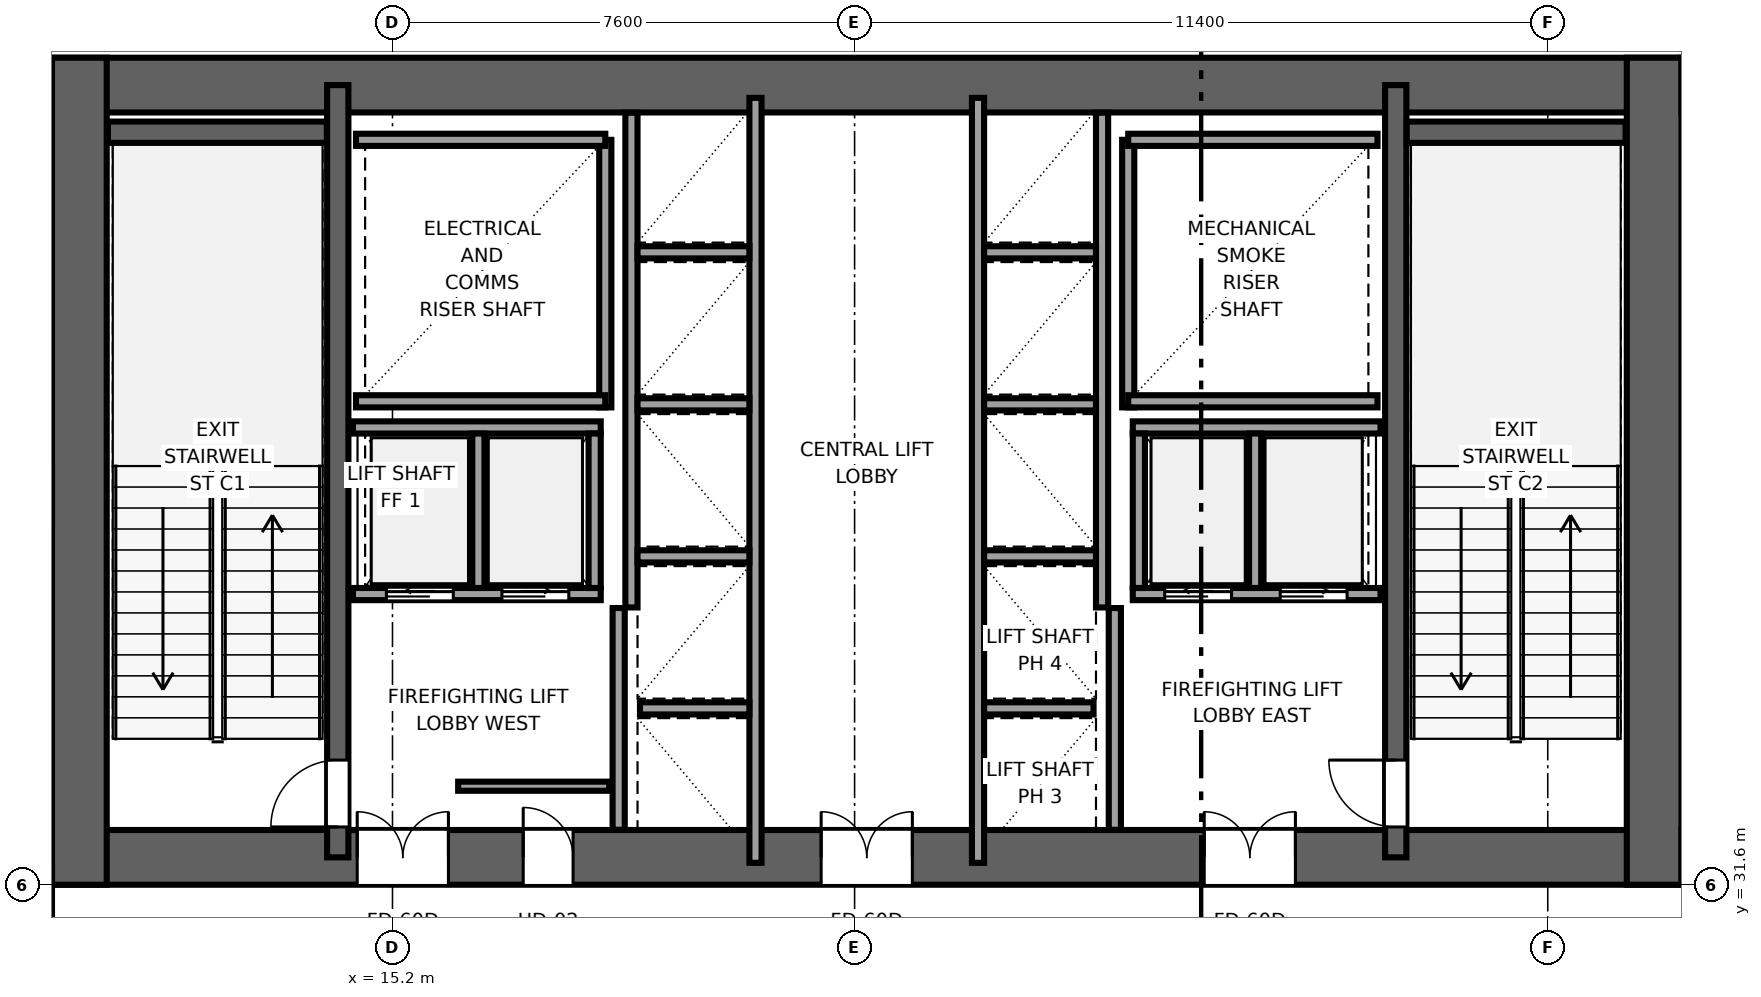
"""IFC4 building model, lengths in metres.
Left out: names, types, materials, properties, quantities, classifications, styles, units other than length and angle.
Written with IfcOpenShell. Run it as: python <this file> out.ifc"""

import sys

from ifc_helpers import new_model, si_unit, direction, frame, frame_2d, origin, place, context, subcontext, project, spatial, rectangle, extrude, source, transform, mapped, element, fill, save


model = new_model("IFC4")
c1 = context("Model", 3, precision=1e-05, world=origin(), true_north=direction((0.0, 1.0)))
c2 = subcontext(c1, "Body", "Model", "MODEL_VIEW")
j1 = project(units=[si_unit("LENGTHUNIT", "METRE"), si_unit("PLANEANGLEUNIT", "RADIAN")], contexts=[c1])
p1 = place(None, origin())
s1 = spatial("IfcSite", under=j1, at=p1, CompositionType="ELEMENT")
p2 = place(p1, origin())
s2 = spatial("IfcBuilding", under=s1, at=p2, CompositionType="ELEMENT")
p3 = place(p2, frame((0.0, 0.0, 6.0)))
s3 = spatial("IfcBuildingStorey", under=s2, at=p3, CompositionType="ELEMENT", Elevation=6.0)
p4 = place(p3, frame((9.6, 32.05, 0.0), z_axis=(0.0, 0.0, 1.0), x_axis=(1.0, 0.0, 0.0)))
e1 = element("IfcWall", 1, at=p4, inside=s3, PredefinedType="SHEAR", context=c2, shape_type="SweptSolid", body=[
    extrude(rectangle(XDim=26.8, YDim=0.9, at=frame_2d((13.4, 0.0))), origin(), (0.0, 0.0, 1.0), 5.0),
])
p5 = place(p4, frame((6.52, 0.0, 0.0), z_axis=(0.0, 0.0, 1.0), x_axis=(-1.0, 0.0, 0.0)))
e2 = element("IfcOpeningElement", 2, at=p5, cuts=e1, PredefinedType="OPENING", context=c2, shape_type="SweptSolid", body=[
    extrude(rectangle(XDim=1.5, YDim=2.04, at=frame_2d((0.75, 1.02))), frame((0.0, 0.46, 0.0), z_axis=(0.0, -1.0, 0.0), x_axis=(1.0, 0.0, 0.0)), (0.0, 0.0, 1.0), 0.92),
])
p6 = place(p4, frame((14.15, 0.0, 0.0), z_axis=(0.0, 0.0, 1.0), x_axis=(-1.0, 0.0, 0.0)))
e3 = element("IfcOpeningElement", 3, at=p6, cuts=e1, PredefinedType="OPENING", context=c2, shape_type="SweptSolid", body=[
    extrude(rectangle(XDim=1.5, YDim=2.04, at=frame_2d((0.75, 1.02))), frame((0.0, 0.46, 0.0), z_axis=(0.0, -1.0, 0.0), x_axis=(1.0, 0.0, 0.0)), (0.0, 0.0, 1.0), 0.92),
])
p7 = place(p4, frame((20.45, 0.0, 0.0), z_axis=(0.0, 0.0, 1.0), x_axis=(-1.0, 0.0, 0.0)))
e4 = element("IfcOpeningElement", 4, at=p7, cuts=e1, PredefinedType="OPENING", context=c2, shape_type="SweptSolid", body=[
    extrude(rectangle(XDim=1.5, YDim=2.04, at=frame_2d((0.75, 1.02))), frame((0.0, 0.46, 0.0), z_axis=(0.0, -1.0, 0.0), x_axis=(1.0, 0.0, 0.0)), (0.0, 0.0, 1.0), 0.92),
])
p8 = place(p4, frame((8.57, 0.0, 0.0), z_axis=(0.0, 0.0, 1.0), x_axis=(-1.0, 0.0, 0.0)))
e5 = element("IfcOpeningElement", 5, at=p8, cuts=e1, PredefinedType="OPENING", context=c2, shape_type="SweptSolid", body=[
    extrude(rectangle(XDim=0.82, YDim=2.01, at=frame_2d((0.41, 1.005))), frame((0.0, 0.46, 0.0), z_axis=(0.0, -1.0, 0.0), x_axis=(1.0, 0.0, 0.0)), (0.0, 0.0, 1.0), 0.92),
])
p9 = place(p3, frame((9.6, 44.75, 0.0), z_axis=(0.0, 0.0, 1.0), x_axis=(1.0, 0.0, 0.0)))
e6 = element("IfcWall", 6, at=p9, inside=s3, PredefinedType="SHEAR", context=c2, shape_type="SweptSolid", body=[
    extrude(rectangle(XDim=26.8, YDim=0.9, at=frame_2d((13.4, 0.0))), origin(), (0.0, 0.0, 1.0), 5.0),
])
for number, where, z_axis, x_axis in (
    (7, (10.05, 31.6, 0.0), (0.0, 0.0, 1.0), (0.0, 1.0, 0.0)),
    (8, (35.95, 31.6, 0.0), (0.0, 0.0, 1.0), (0.0, 1.0, 0.0)),
):
    element("IfcWall", number, at=place(p3, frame(where, z_axis=z_axis, x_axis=x_axis)), inside=s3, PredefinedType="SHEAR", context=c2, shape_type="SweptSolid", body=[
        extrude(rectangle(XDim=13.6, YDim=0.9, at=frame_2d((6.8, 0.0))), origin(), (0.0, 0.0, 1.0), 5.0),
    ])
p10 = place(p3, frame((14.3, 32.05, 0.0), z_axis=(0.0, 0.0, 1.0), x_axis=(0.0, 1.0, 0.0)))
e9 = element("IfcWall", 9, at=p10, inside=s3, PredefinedType="SHEAR", context=c2, shape_type="SweptSolid", body=[
    extrude(rectangle(XDim=12.7, YDim=0.35, at=frame_2d((6.35, 0.0))), origin(), (0.0, 0.0, 1.0), 5.0),
])
p11 = place(p10, frame((0.5, 0.0, 0.0)))
e10 = element("IfcOpeningElement", 10, at=p11, cuts=e9, PredefinedType="OPENING", context=c2, shape_type="SweptSolid", body=[
    extrude(rectangle(XDim=1.1, YDim=2.12, at=frame_2d((0.55, 1.06))), frame((0.0, 0.185, 0.0), z_axis=(0.0, -1.0, 0.0), x_axis=(1.0, 0.0, 0.0)), (0.0, 0.0, 1.0), 0.37),
])
p12 = place(p3, frame((31.7, 32.05, 0.0), z_axis=(0.0, 0.0, 1.0), x_axis=(0.0, 1.0, 0.0)))
e11 = element("IfcWall", 11, at=p12, inside=s3, PredefinedType="SHEAR", context=c2, shape_type="SweptSolid", body=[
    extrude(rectangle(XDim=12.7, YDim=0.35, at=frame_2d((6.35, 0.0))), origin(), (0.0, 0.0, 1.0), 5.0),
])
p13 = place(p12, frame((1.6, 0.0, 0.0), z_axis=(0.0, 0.0, 1.0), x_axis=(-1.0, 0.0, 0.0)))
e12 = element("IfcOpeningElement", 12, at=p13, cuts=e11, PredefinedType="OPENING", context=c2, shape_type="SweptSolid", body=[
    extrude(rectangle(XDim=1.1, YDim=2.12, at=frame_2d((0.55, 1.06))), frame((0.0, 0.185, 0.0), z_axis=(0.0, -1.0, 0.0), x_axis=(1.0, 0.0, 0.0)), (0.0, 0.0, 1.0), 0.37),
])
for number, where, z_axis, x_axis in (
    (13, (10.52, 43.975, 0.0), (0.0, 0.0, 1.0), (1.0, 0.0, 0.0)),
    (14, (31.88, 43.975, 0.0), (0.0, 0.0, 1.0), (1.0, 0.0, 0.0)),
):
    element("IfcWall", number, at=place(p3, frame(where, z_axis=z_axis, x_axis=x_axis)), inside=s3, PredefinedType="SHEAR", context=c2, shape_type="SweptSolid", body=[
        extrude(rectangle(XDim=3.6, YDim=0.35, at=frame_2d((1.8, 0.0))), origin(), (0.0, 0.0, 1.0), 5.0),
    ])
p14 = place(p3, frame((18.7, 39.45, 0.0), z_axis=(0.0, 0.0, 1.0), x_axis=(0.0, 1.0, 0.0)))
e15 = element("IfcWall", 15, at=p14, inside=s3, PredefinedType="SOLIDWALL", context=c2, shape_type="SweptSolid", body=[
    extrude(rectangle(XDim=4.4, YDim=0.2, at=frame_2d((2.2, 0.0))), origin(), (0.0, 0.0, 1.0), 4.74),
])
for number, where, z_axis, x_axis in (
    (16, (14.6, 39.55, 0.0), (0.0, 0.0, 1.0), (1.0, 0.0, 0.0)),
    (17, (14.6, 43.85, 0.0), (0.0, 0.0, 1.0), (1.0, 0.0, 0.0)),
):
    element("IfcWall", number, at=place(p3, frame(where, z_axis=z_axis, x_axis=x_axis)), inside=s3, PredefinedType="SOLIDWALL", context=c2, shape_type="SweptSolid", body=[
        extrude(rectangle(XDim=4.1, YDim=0.2, at=frame_2d((2.05, 0.0))), origin(), (0.0, 0.0, 1.0), 4.74),
    ])
p15 = place(p3, frame((27.3, 39.45, 0.0), z_axis=(0.0, 0.0, 1.0), x_axis=(0.0, 1.0, 0.0)))
e18 = element("IfcWall", 18, at=p15, inside=s3, PredefinedType="SOLIDWALL", context=c2, shape_type="SweptSolid", body=[
    extrude(rectangle(XDim=4.4, YDim=0.2, at=frame_2d((2.2, 0.0))), origin(), (0.0, 0.0, 1.0), 4.74),
])
for number, where, z_axis, x_axis in (
    (19, (27.3, 39.55, 0.0), (0.0, 0.0, 1.0), (1.0, 0.0, 0.0)),
    (20, (27.3, 43.85, 0.0), (0.0, 0.0, 1.0), (1.0, 0.0, 0.0)),
):
    element("IfcWall", number, at=place(p3, frame(where, z_axis=z_axis, x_axis=x_axis)), inside=s3, PredefinedType="SOLIDWALL", context=c2, shape_type="SweptSolid", body=[
        extrude(rectangle(XDim=4.1, YDim=0.2, at=frame_2d((2.05, 0.0))), origin(), (0.0, 0.0, 1.0), 4.74),
    ])
for number, where, z_axis, x_axis in (
    (21, (18.92, 32.504, 0.0), (0.0, 0.0, 1.0), (0.0, 1.0, 0.0)),
    (22, (27.08, 32.504, 0.0), (0.0, 0.0, 1.0), (0.0, 1.0, 0.0)),
):
    element("IfcWall", number, at=place(p3, frame(where, z_axis=z_axis, x_axis=x_axis)), inside=s3, PredefinedType="SOLIDWALL", context=c2, shape_type="SweptSolid", body=[
        extrude(rectangle(XDim=3.646, YDim=0.2, at=frame_2d((1.823, 0.0))), origin(), (0.0, 0.0, 1.0), 4.74),
    ])
p16 = place(p3, frame((21.17, 31.96, 0.0), z_axis=(0.0, 0.0, 1.0), x_axis=(0.0, 1.0, 0.0)))
e23 = element("IfcWall", 23, at=p16, inside=s3, PredefinedType="SOLIDWALL", context=c2, shape_type="SweptSolid", body=[
    extrude(rectangle(XDim=12.58, YDim=0.2, at=frame_2d((6.29, 0.0))), origin(), (0.0, 0.0, 1.0), 4.74),
])
p17 = place(p3, frame((19.13, 36.16, 0.0), z_axis=(0.0, 0.0, 1.0), x_axis=(0.0, 1.0, 0.0)))
e24 = element("IfcWall", 24, at=p17, inside=s3, PredefinedType="SOLIDWALL", context=c2, shape_type="SweptSolid", body=[
    extrude(rectangle(XDim=8.136, YDim=0.2, at=frame_2d((4.068, 0.0))), origin(), (0.0, 0.0, 1.0), 4.74),
])
p18 = place(p3, frame((19.27, 34.5, 0.0), z_axis=(0.0, 0.0, 1.0), x_axis=(1.0, 0.0, 0.0)))
e25 = element("IfcWall", 25, at=p18, inside=s3, PredefinedType="SOLIDWALL", context=c2, shape_type="SweptSolid", body=[
    extrude(rectangle(XDim=1.8, YDim=0.2, at=frame_2d((0.9, 0.0))), origin(), (0.0, 0.0, 1.0), 4.74),
])
for number, where, z_axis, x_axis in (
    (26, (19.23, 37.0, 0.0), (0.0, 0.0, 1.0), (1.0, 0.0, 0.0)),
    (27, (19.23, 39.5, 0.0), (0.0, 0.0, 1.0), (1.0, 0.0, 0.0)),
    (28, (19.23, 42.0, 0.0), (0.0, 0.0, 1.0), (1.0, 0.0, 0.0)),
):
    element("IfcWall", number, at=place(p3, frame(where, z_axis=z_axis, x_axis=x_axis)), inside=s3, PredefinedType="SOLIDWALL", context=c2, shape_type="SweptSolid", body=[
        extrude(rectangle(XDim=1.84, YDim=0.2, at=frame_2d((0.92, 0.0))), origin(), (0.0, 0.0, 1.0), 4.74),
    ])
p19 = place(p3, frame((27.375, 36.38, 0.0), z_axis=(0.0, 0.0, 1.0), x_axis=(1.0, 0.0, 0.0)))
e29 = element("IfcWall", 29, at=p19, inside=s3, PredefinedType="SOLIDWALL", context=c2, shape_type="SweptSolid", body=[
    extrude(rectangle(XDim=4.075, YDim=0.2, at=frame_2d((2.038, 0.0))), origin(), (0.0, 0.0, 1.0), 4.74),
])
p20 = place(p19, frame((0.525, 0.0, 0.0)))
e30 = element("IfcOpeningElement", 30, at=p20, cuts=e29, PredefinedType="OPENING", context=c2, shape_type="SweptSolid", body=[
    extrude(rectangle(XDim=1.1, YDim=2.12, at=frame_2d((0.55, 1.06))), frame((0.0, 0.11, 0.0), z_axis=(0.0, -1.0, 0.0), x_axis=(1.0, 0.0, 0.0)), (0.0, 0.0, 1.0), 0.22),
])
p21 = place(p19, frame((2.425, 0.0, 0.0)))
e31 = element("IfcOpeningElement", 31, at=p21, cuts=e29, PredefinedType="OPENING", context=c2, shape_type="SweptSolid", body=[
    extrude(rectangle(XDim=1.1, YDim=2.12, at=frame_2d((0.55, 1.06))), frame((0.0, 0.11, 0.0), z_axis=(0.0, -1.0, 0.0), x_axis=(1.0, 0.0, 0.0)), (0.0, 0.0, 1.0), 0.22),
])
p22 = place(p3, frame((27.375, 39.12, 0.0), z_axis=(0.0, 0.0, 1.0), x_axis=(1.0, 0.0, 0.0)))
e32 = element("IfcWall", 32, at=p22, inside=s3, PredefinedType="SOLIDWALL", context=c2, shape_type="SweptSolid", body=[
    extrude(rectangle(XDim=4.075, YDim=0.2, at=frame_2d((2.038, 0.0))), origin(), (0.0, 0.0, 1.0), 4.74),
])
for number, where, z_axis, x_axis in (
    (33, (27.475, 36.48, 0.0), (0.0, 0.0, 1.0), (0.0, 1.0, 0.0)),
    (34, (29.387, 36.48, 0.0), (0.0, 0.0, 1.0), (0.0, 1.0, 0.0)),
):
    element("IfcWall", number, at=place(p3, frame(where, z_axis=z_axis, x_axis=x_axis)), inside=s3, PredefinedType="SOLIDWALL", context=c2, shape_type="SweptSolid", body=[
        extrude(rectangle(XDim=2.54, YDim=0.2, at=frame_2d((1.27, 0.0))), origin(), (0.0, 0.0, 1.0), 4.74),
    ])
p23 = place(p3, frame((14.55, 36.38, 0.0), z_axis=(0.0, 0.0, 1.0), x_axis=(1.0, 0.0, 0.0)))
e35 = element("IfcWall", 35, at=p23, inside=s3, PredefinedType="SOLIDWALL", context=c2, shape_type="SweptSolid", body=[
    extrude(rectangle(XDim=4.075, YDim=0.2, at=frame_2d((2.038, 0.0))), origin(), (0.0, 0.0, 1.0), 4.74),
])
p24 = place(p23, frame((0.55, 0.0, 0.0)))
e36 = element("IfcOpeningElement", 36, at=p24, cuts=e35, PredefinedType="OPENING", context=c2, shape_type="SweptSolid", body=[
    extrude(rectangle(XDim=1.1, YDim=2.12, at=frame_2d((0.55, 1.06))), frame((0.0, 0.11, 0.0), z_axis=(0.0, -1.0, 0.0), x_axis=(1.0, 0.0, 0.0)), (0.0, 0.0, 1.0), 0.22),
])
p25 = place(p23, frame((2.45, 0.0, 0.0)))
e37 = element("IfcOpeningElement", 37, at=p25, cuts=e35, PredefinedType="OPENING", context=c2, shape_type="SweptSolid", body=[
    extrude(rectangle(XDim=1.1, YDim=2.12, at=frame_2d((0.55, 1.06))), frame((0.0, 0.11, 0.0), z_axis=(0.0, -1.0, 0.0), x_axis=(1.0, 0.0, 0.0)), (0.0, 0.0, 1.0), 0.22),
])
p26 = place(p3, frame((14.55, 39.12, 0.0), z_axis=(0.0, 0.0, 1.0), x_axis=(1.0, 0.0, 0.0)))
e38 = element("IfcWall", 38, at=p26, inside=s3, PredefinedType="SOLIDWALL", context=c2, shape_type="SweptSolid", body=[
    extrude(rectangle(XDim=4.075, YDim=0.2, at=frame_2d((2.038, 0.0))), origin(), (0.0, 0.0, 1.0), 4.74),
])
for number, where, z_axis, x_axis in (
    (39, (18.525, 36.48, 0.0), (0.0, 0.0, 1.0), (0.0, 1.0, 0.0)),
    (40, (16.613, 36.48, 0.0), (0.0, 0.0, 1.0), (0.0, 1.0, 0.0)),
):
    element("IfcWall", number, at=place(p3, frame(where, z_axis=z_axis, x_axis=x_axis)), inside=s3, PredefinedType="SOLIDWALL", context=c2, shape_type="SweptSolid", body=[
        extrude(rectangle(XDim=2.54, YDim=0.2, at=frame_2d((1.27, 0.0))), origin(), (0.0, 0.0, 1.0), 4.74),
    ])
p27 = place(p3, frame((24.83, 31.96, 0.0), z_axis=(0.0, 0.0, 1.0), x_axis=(0.0, 1.0, 0.0)))
e41 = element("IfcWall", 41, at=p27, inside=s3, PredefinedType="SOLIDWALL", context=c2, shape_type="SweptSolid", body=[
    extrude(rectangle(XDim=12.58, YDim=0.2, at=frame_2d((6.29, 0.0))), origin(), (0.0, 0.0, 1.0), 4.74),
])
p28 = place(p3, frame((26.87, 36.16, 0.0), z_axis=(0.0, 0.0, 1.0), x_axis=(0.0, 1.0, 0.0)))
e42 = element("IfcWall", 42, at=p28, inside=s3, PredefinedType="SOLIDWALL", context=c2, shape_type="SweptSolid", body=[
    extrude(rectangle(XDim=8.136, YDim=0.2, at=frame_2d((4.068, 0.0))), origin(), (0.0, 0.0, 1.0), 4.74),
])
p29 = place(p3, frame((24.93, 34.5, 0.0), z_axis=(0.0, 0.0, 1.0), x_axis=(1.0, 0.0, 0.0)))
e43 = element("IfcWall", 43, at=p29, inside=s3, PredefinedType="SOLIDWALL", context=c2, shape_type="SweptSolid", body=[
    extrude(rectangle(XDim=1.8, YDim=0.2, at=frame_2d((0.9, 0.0))), origin(), (0.0, 0.0, 1.0), 4.74),
])
for number, where, z_axis, x_axis in (
    (44, (24.93, 37.0, 0.0), (0.0, 0.0, 1.0), (1.0, 0.0, 0.0)),
    (45, (24.93, 39.5, 0.0), (0.0, 0.0, 1.0), (1.0, 0.0, 0.0)),
    (46, (24.93, 42.0, 0.0), (0.0, 0.0, 1.0), (1.0, 0.0, 0.0)),
):
    element("IfcWall", number, at=place(p3, frame(where, z_axis=z_axis, x_axis=x_axis)), inside=s3, PredefinedType="SOLIDWALL", context=c2, shape_type="SweptSolid", body=[
        extrude(rectangle(XDim=1.84, YDim=0.2, at=frame_2d((0.92, 0.0))), origin(), (0.0, 0.0, 1.0), 4.74),
    ])
p30 = place(p3, frame((16.28, 33.22, 0.0), z_axis=(0.0, 0.0, 1.0), x_axis=(1.0, 0.0, 0.0)))
e47 = element("IfcWall", 47, at=p30, inside=s3, PredefinedType="PARTITIONING", context=c2, shape_type="SweptSolid", body=[
    extrude(rectangle(XDim=2.485, YDim=0.15, at=frame_2d((1.242, 0.0))), origin(), (0.0, 0.0, 1.0), 4.74),
])
m1 = source(origin(), c2, "Body", "SweptSolid", [
    extrude(rectangle(XDim=1.1, YDim=2.12, at=frame_2d((0.55, 1.06))), frame((0.0, 0.025, 0.0), z_axis=(0.0, -1.0, 0.0), x_axis=(1.0, 0.0, 0.0)), (0.0, 0.0, 1.0), 0.05),
])
p31 = place(p11, origin())
e48 = element("IfcDoor", 48, at=p31, inside=s3, OperationType="SINGLE_SWING_LEFT", PredefinedType="DOOR", context=c2, shape_type="MappedRepresentation", body=[
    mapped(m1, transform((0.0, 0.0, 0.0), x_axis=(1.0, 0.0, 0.0), y_axis=(0.0, 1.0, 0.0), z_axis=(0.0, 0.0, 1.0), scale=1.0)),
])
fill(e10, e48)
p32 = place(p13, origin())
e49 = element("IfcDoor", 49, at=p32, inside=s3, OperationType="SINGLE_SWING_RIGHT", PredefinedType="DOOR", context=c2, shape_type="MappedRepresentation", body=[
    mapped(m1, transform((0.0, 0.0, 0.0), x_axis=(1.0, 0.0, 0.0), y_axis=(0.0, 1.0, 0.0), z_axis=(0.0, 0.0, 1.0), scale=1.0)),
])
fill(e12, e49)
m2 = source(origin(), c2, "Body", "SweptSolid", [
    extrude(rectangle(XDim=1.5, YDim=2.04, at=frame_2d((0.75, 1.02))), frame((0.0, 0.025, 0.0), z_axis=(0.0, -1.0, 0.0), x_axis=(1.0, 0.0, 0.0)), (0.0, 0.0, 1.0), 0.05),
])
p33 = place(p5, origin())
e50 = element("IfcDoor", 50, at=p33, inside=s3, OperationType="DOUBLE_DOOR_SINGLE_SWING", PredefinedType="DOOR", context=c2, shape_type="MappedRepresentation", body=[
    mapped(m2, transform((0.0, 0.0, 0.0), x_axis=(1.0, 0.0, 0.0), y_axis=(0.0, 1.0, 0.0), z_axis=(0.0, 0.0, 1.0), scale=1.0)),
])
fill(e2, e50)
p34 = place(p6, origin())
e51 = element("IfcDoor", 51, at=p34, inside=s3, OperationType="DOUBLE_DOOR_SINGLE_SWING", PredefinedType="DOOR", context=c2, shape_type="MappedRepresentation", body=[
    mapped(m2, transform((0.0, 0.0, 0.0), x_axis=(1.0, 0.0, 0.0), y_axis=(0.0, 1.0, 0.0), z_axis=(0.0, 0.0, 1.0), scale=1.0)),
])
fill(e3, e51)
p35 = place(p7, origin())
e52 = element("IfcDoor", 52, at=p35, inside=s3, OperationType="DOUBLE_DOOR_SINGLE_SWING", PredefinedType="DOOR", context=c2, shape_type="MappedRepresentation", body=[
    mapped(m2, transform((0.0, 0.0, 0.0), x_axis=(1.0, 0.0, 0.0), y_axis=(0.0, 1.0, 0.0), z_axis=(0.0, 0.0, 1.0), scale=1.0)),
])
fill(e4, e52)
m3 = source(origin(), c2, "Body", "SweptSolid", [
    extrude(rectangle(XDim=0.82, YDim=2.01, at=frame_2d((0.41, 1.005))), frame((0.0, 0.025, 0.0), z_axis=(0.0, -1.0, 0.0), x_axis=(1.0, 0.0, 0.0)), (0.0, 0.0, 1.0), 0.05),
])
p36 = place(p8, origin())
e53 = element("IfcDoor", 53, at=p36, inside=s3, OperationType="SINGLE_SWING_LEFT", PredefinedType="DOOR", context=c2, shape_type="MappedRepresentation", body=[
    mapped(m3, transform((0.0, 0.0, 0.0), x_axis=(1.0, 0.0, 0.0), y_axis=(0.0, 1.0, 0.0), z_axis=(0.0, 0.0, 1.0), scale=1.0)),
])
fill(e5, e53)
m4 = source(origin(), c2, "Body", "SweptSolid", [
    extrude(rectangle(XDim=1.1, YDim=2.12, at=frame_2d((0.55, 1.06))), frame((0.0, 0.025, 0.0), z_axis=(0.0, -1.0, 0.0), x_axis=(1.0, 0.0, 0.0)), (0.0, 0.0, 1.0), 0.05),
])
p37 = place(p20, origin())
e54 = element("IfcDoor", 54, at=p37, inside=s3, OperationType="SLIDING_TO_LEFT", PredefinedType="DOOR", context=c2, shape_type="MappedRepresentation", body=[
    mapped(m4, transform((0.0, 0.0, 0.0), x_axis=(1.0, 0.0, 0.0), y_axis=(0.0, 1.0, 0.0), z_axis=(0.0, 0.0, 1.0), scale=1.0)),
])
fill(e30, e54)
p38 = place(p21, origin())
e55 = element("IfcDoor", 55, at=p38, inside=s3, OperationType="SLIDING_TO_RIGHT", PredefinedType="DOOR", context=c2, shape_type="MappedRepresentation", body=[
    mapped(m4, transform((0.0, 0.0, 0.0), x_axis=(1.0, 0.0, 0.0), y_axis=(0.0, 1.0, 0.0), z_axis=(0.0, 0.0, 1.0), scale=1.0)),
])
fill(e31, e55)
p39 = place(p24, origin())
e56 = element("IfcDoor", 56, at=p39, inside=s3, OperationType="SLIDING_TO_LEFT", PredefinedType="DOOR", context=c2, shape_type="MappedRepresentation", body=[
    mapped(m4, transform((0.0, 0.0, 0.0), x_axis=(1.0, 0.0, 0.0), y_axis=(0.0, 1.0, 0.0), z_axis=(0.0, 0.0, 1.0), scale=1.0)),
])
fill(e36, e56)
p40 = place(p25, origin())
e57 = element("IfcDoor", 57, at=p40, inside=s3, OperationType="SLIDING_TO_RIGHT", PredefinedType="DOOR", context=c2, shape_type="MappedRepresentation", body=[
    mapped(m4, transform((0.0, 0.0, 0.0), x_axis=(1.0, 0.0, 0.0), y_axis=(0.0, 1.0, 0.0), z_axis=(0.0, 0.0, 1.0), scale=1.0)),
])
fill(e37, e57)
save(model, sys.argv[1])
